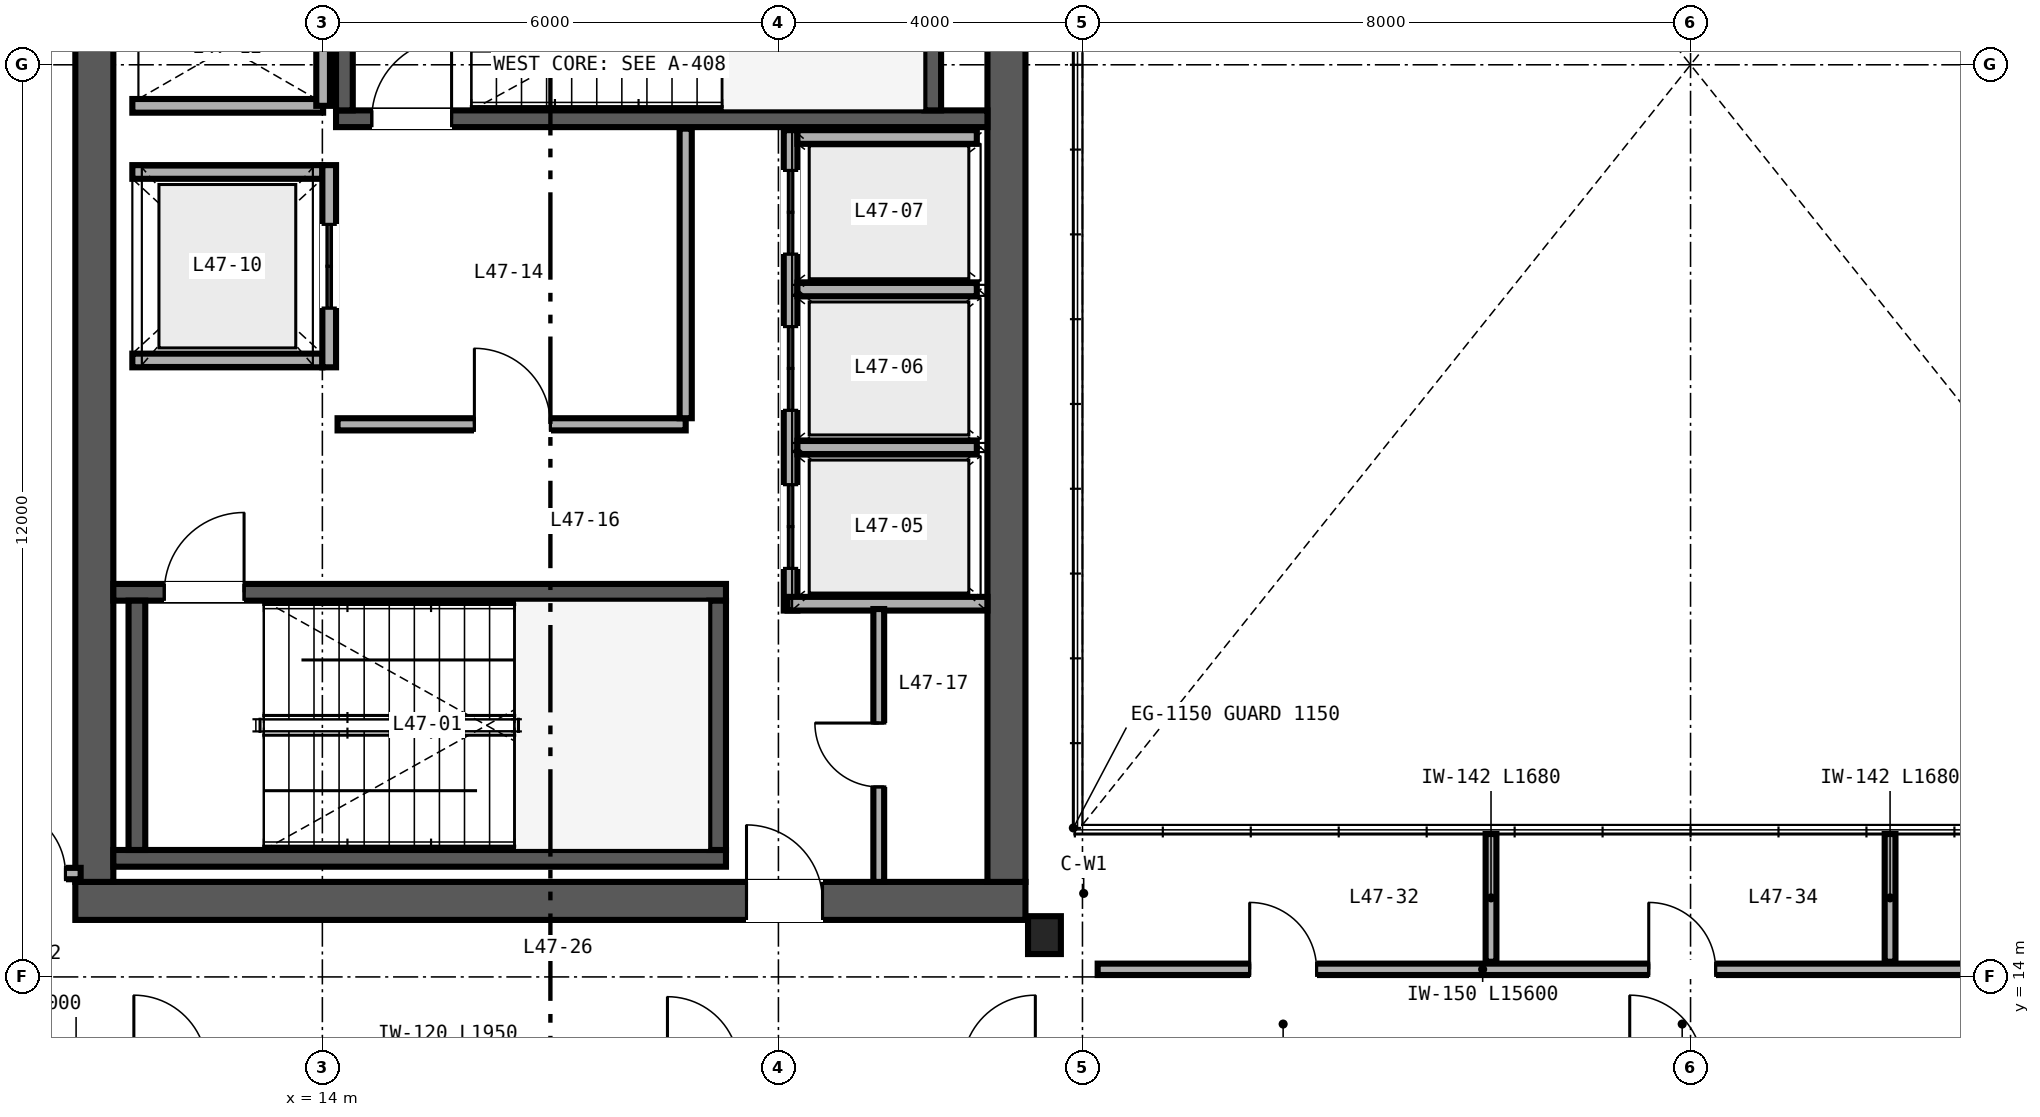
"""IFC4 building model, lengths in metres.
Left out: names, types, materials, properties, quantities, classifications, styles, units other than length and angle.
Written with IfcOpenShell. Run it as: python <this file> out.ifc"""

import sys

from ifc_helpers import new_model, si_unit, direction, frame, frame_2d, origin, origin_2d, place, context, subcontext, project, spatial, rectangle, i_section, extrude, source, transform, mapped, element, fill, save


model = new_model("IFC4")
c1 = context("Model", 3, precision=1e-05, world=origin(), true_north=direction((0.0, 1.0)))
c2 = subcontext(c1, "Body", "Model", "MODEL_VIEW")
j1 = project(units=[si_unit("LENGTHUNIT", "METRE"), si_unit("PLANEANGLEUNIT", "RADIAN")], contexts=[c1])
p1 = place(None, origin())
s1 = spatial("IfcSite", under=j1, at=p1, CompositionType="ELEMENT")
p2 = place(p1, origin())
s2 = spatial("IfcBuilding", under=s1, at=p2, CompositionType="ELEMENT")
p3 = place(p2, frame((0.0, 0.0, 188.4)))
s3 = spatial("IfcBuildingStorey", under=s2, at=p3, CompositionType="ELEMENT", Elevation=188.4)
p4 = place(p3, frame((10.75, 15.0, 0.0), z_axis=(0.0, 0.0, 1.0), x_axis=(1.0, 0.0, 0.0)))
e1 = element("IfcWall", 1, at=p4, inside=s3, PredefinedType="SHEAR", context=c2, shape_type="SweptSolid", body=[
    extrude(rectangle(XDim=12.5, YDim=0.5, at=frame_2d((6.25, 0.0))), origin(), (0.0, 0.0, 1.0), 3.37),
])
p5 = place(p4, frame((8.83, 0.0, 0.0)))
e2 = element("IfcOpeningElement", 2, at=p5, cuts=e1, PredefinedType="OPENING", context=c2, shape_type="SweptSolid", body=[
    extrude(rectangle(XDim=1.0, YDim=2.15, at=frame_2d((0.5, 1.075))), frame((0.0, 0.26, 0.0), z_axis=(0.0, -1.0, 0.0), x_axis=(1.0, 0.0, 0.0)), (0.0, 0.0, 1.0), 0.52),
])
for number, where, z_axis, x_axis in (
    (3, (11.0, 15.25, 0.0), (0.0, 0.0, 1.0), (0.0, 1.0, 0.0)),
    (4, (23.0, 15.25, 0.0), (0.0, 0.0, 1.0), (0.0, 1.0, 0.0)),
):
    element("IfcWall", number, at=place(p3, frame(where, z_axis=z_axis, x_axis=x_axis)), inside=s3, PredefinedType="SHEAR", context=c2, shape_type="SweptSolid", body=[
        extrude(rectangle(XDim=21.5, YDim=0.5, at=frame_2d((10.75, 0.0))), origin(), (0.0, 0.0, 1.0), 3.37),
    ])
p6 = place(p3, frame((11.25, 15.56, 0.0), z_axis=(0.0, 0.0, 1.0), x_axis=(1.0, 0.0, 0.0)))
e5 = element("IfcWall", 5, at=p6, inside=s3, PredefinedType="SHEAR", context=c2, shape_type="SweptSolid", body=[
    extrude(rectangle(XDim=8.06, YDim=0.22, at=frame_2d((4.03, 0.0))), origin(), (0.0, 0.0, 1.0), 3.4),
])
p7 = place(p3, frame((11.25, 19.06, 0.0), z_axis=(0.0, 0.0, 1.0), x_axis=(1.0, 0.0, 0.0)))
e6 = element("IfcWall", 6, at=p7, inside=s3, PredefinedType="SHEAR", context=c2, shape_type="SweptSolid", body=[
    extrude(rectangle(XDim=8.06, YDim=0.22, at=frame_2d((4.03, 0.0))), origin(), (0.0, 0.0, 1.0), 3.4),
])
p8 = place(p7, frame((0.67, 0.0, 0.0)))
e7 = element("IfcOpeningElement", 7, at=p8, cuts=e6, PredefinedType="OPENING", context=c2, shape_type="SweptSolid", body=[
    extrude(rectangle(XDim=1.05, YDim=2.15, at=frame_2d((0.525, 1.075))), frame((0.0, 0.12, 0.0), z_axis=(0.0, -1.0, 0.0), x_axis=(1.0, 0.0, 0.0)), (0.0, 0.0, 1.0), 0.24),
])
for number, where, z_axis, x_axis in (
    (8, (11.56, 15.67, 0.0), (0.0, 0.0, 1.0), (0.0, 1.0, 0.0)),
    (9, (19.2, 15.67, 0.0), (0.0, 0.0, 1.0), (0.0, 1.0, 0.0)),
):
    element("IfcWall", number, at=place(p3, frame(where, z_axis=z_axis, x_axis=x_axis)), inside=s3, PredefinedType="SHEAR", context=c2, shape_type="SweptSolid", body=[
        extrude(rectangle(XDim=3.28, YDim=0.22, at=frame_2d((1.64, 0.0))), origin(), (0.0, 0.0, 1.0), 3.4),
    ])
p9 = place(p3, frame((14.18, 25.29, 0.0), z_axis=(0.0, 0.0, 1.0), x_axis=(1.0, 0.0, 0.0)))
e10 = element("IfcWall", 10, at=p9, inside=s3, PredefinedType="SHEAR", context=c2, shape_type="SweptSolid", body=[
    extrude(rectangle(XDim=8.57, YDim=0.22, at=frame_2d((4.285, 0.0))), origin(), (0.0, 0.0, 1.0), 3.4),
])
p10 = place(p9, frame((0.47, 0.0, 0.0)))
e11 = element("IfcOpeningElement", 11, at=p10, cuts=e10, PredefinedType="OPENING", context=c2, shape_type="SweptSolid", body=[
    extrude(rectangle(XDim=1.05, YDim=2.15, at=frame_2d((0.525, 1.075))), frame((0.0, 0.12, 0.0), z_axis=(0.0, -1.0, 0.0), x_axis=(1.0, 0.0, 0.0)), (0.0, 0.0, 1.0), 0.24),
])
for number, where, z_axis, x_axis in (
    (12, (14.29, 25.4, 0.0), (0.0, 0.0, 1.0), (0.0, 1.0, 0.0)),
    (13, (22.03, 25.4, 0.0), (0.0, 0.0, 1.0), (0.0, 1.0, 0.0)),
):
    element("IfcWall", number, at=place(p3, frame(where, z_axis=z_axis, x_axis=x_axis)), inside=s3, PredefinedType="SHEAR", context=c2, shape_type="SweptSolid", body=[
        extrude(rectangle(XDim=3.28, YDim=0.22, at=frame_2d((1.64, 0.0))), origin(), (0.0, 0.0, 1.0), 3.4),
    ])
m1 = source(origin(), c2, "Body", "SweptSolid", [
    extrude(i_section(OverallWidth=0.432, OverallDepth=0.498, WebThickness=0.056, FlangeThickness=0.089, FilletRadius=0.025, at=origin_2d()), origin(), (0.0, 0.0, 1.0), 3.37),
])
p11 = place(p3, frame((23.5, 14.55, 0.0), z_axis=(0.0, 0.0, 1.0), x_axis=(1.0, 0.0, 0.0)))
e14 = element("IfcColumn", 14, at=p11, inside=s3, PredefinedType="COLUMN", context=c2, shape_type="MappedRepresentation", body=[
    mapped(m1, transform((0.0, 0.0, 0.0), scale=1.0)),
])
p12 = place(p3, frame((20.16, 18.82, 0.0), z_axis=(0.0, 0.0, 1.0), x_axis=(0.0, 1.0, 0.0)))
e15 = element("IfcWall", 15, at=p12, inside=s3, PredefinedType="SOLIDWALL", context=c2, shape_type="SweptSolid", body=[
    extrude(rectangle(XDim=6.32, YDim=0.18, at=frame_2d((3.16, 0.0))), origin(), (0.0, 0.0, 1.0), 2.47),
])
p13 = place(p12, frame((0.555, 0.0, 0.0)))
e16 = element("IfcOpeningElement", 16, at=p13, cuts=e15, PredefinedType="OPENING", context=c2, shape_type="SweptSolid", body=[
    extrude(rectangle(XDim=1.1, YDim=2.2, at=frame_2d((0.55, 1.1))), frame((0.0, 0.1, 0.0), z_axis=(0.0, -1.0, 0.0), x_axis=(1.0, 0.0, 0.0)), (0.0, 0.0, 1.0), 0.2),
])
p14 = place(p12, frame((2.635, 0.0, 0.0)))
e17 = element("IfcOpeningElement", 17, at=p14, cuts=e15, PredefinedType="OPENING", context=c2, shape_type="SweptSolid", body=[
    extrude(rectangle(XDim=1.1, YDim=2.2, at=frame_2d((0.55, 1.1))), frame((0.0, 0.1, 0.0), z_axis=(0.0, -1.0, 0.0), x_axis=(1.0, 0.0, 0.0)), (0.0, 0.0, 1.0), 0.2),
])
p15 = place(p12, frame((4.69, 0.0, 0.0)))
e18 = element("IfcOpeningElement", 18, at=p15, cuts=e15, PredefinedType="OPENING", context=c2, shape_type="SweptSolid", body=[
    extrude(rectangle(XDim=1.1, YDim=2.2, at=frame_2d((0.55, 1.1))), frame((0.0, 0.1, 0.0), z_axis=(0.0, -1.0, 0.0), x_axis=(1.0, 0.0, 0.0)), (0.0, 0.0, 1.0), 0.2),
])
p16 = place(p3, frame((20.12, 18.91, 0.0), z_axis=(0.0, 0.0, 1.0), x_axis=(1.0, 0.0, 0.0)))
e19 = element("IfcWall", 19, at=p16, inside=s3, PredefinedType="SOLIDWALL", context=c2, shape_type="SweptSolid", body=[
    extrude(rectangle(XDim=2.63, YDim=0.18, at=frame_2d((1.315, 0.0))), origin(), (0.0, 0.0, 1.0), 3.37),
])
p17 = place(p3, frame((20.25, 25.05, 0.0), z_axis=(0.0, 0.0, 1.0), x_axis=(1.0, 0.0, 0.0)))
e20 = element("IfcWall", 20, at=p17, inside=s3, PredefinedType="SOLIDWALL", context=c2, shape_type="SweptSolid", body=[
    extrude(rectangle(XDim=2.36, YDim=0.18, at=frame_2d((1.18, 0.0))), origin(), (0.0, 0.0, 1.0), 3.37),
])
p18 = place(p3, frame((20.25, 20.965, 0.0), z_axis=(0.0, 0.0, 1.0), x_axis=(1.0, 0.0, 0.0)))
e21 = element("IfcWall", 21, at=p18, inside=s3, PredefinedType="SOLIDWALL", context=c2, shape_type="SweptSolid", body=[
    extrude(rectangle(XDim=2.36, YDim=0.18, at=frame_2d((1.18, 0.0))), origin(), (0.0, 0.0, 1.0), 2.47),
])
p19 = place(p3, frame((20.25, 23.045, 0.0), z_axis=(0.0, 0.0, 1.0), x_axis=(1.0, 0.0, 0.0)))
e22 = element("IfcWall", 22, at=p19, inside=s3, PredefinedType="SOLIDWALL", context=c2, shape_type="SweptSolid", body=[
    extrude(rectangle(XDim=2.36, YDim=0.18, at=frame_2d((1.18, 0.0))), origin(), (0.0, 0.0, 1.0), 3.37),
])
for number, where, z_axis, x_axis in (
    (23, (11.5, 22.11, 0.0), (0.0, 0.0, 1.0), (1.0, 0.0, 0.0)),
    (24, (11.5, 24.59, 0.0), (0.0, 0.0, 1.0), (1.0, 0.0, 0.0)),
):
    element("IfcWall", number, at=place(p3, frame(where, z_axis=z_axis, x_axis=x_axis)), inside=s3, PredefinedType="SOLIDWALL", context=c2, shape_type="SweptSolid", body=[
        extrude(rectangle(XDim=2.5, YDim=0.18, at=frame_2d((1.25, 0.0))), origin(), (0.0, 0.0, 1.0), 3.37),
    ])
p20 = place(p3, frame((14.09, 22.02, 0.0), z_axis=(0.0, 0.0, 1.0), x_axis=(0.0, 1.0, 0.0)))
e25 = element("IfcWall", 25, at=p20, inside=s3, PredefinedType="SOLIDWALL", context=c2, shape_type="SweptSolid", body=[
    extrude(rectangle(XDim=2.66, YDim=0.18, at=frame_2d((1.33, 0.0))), origin(), (0.0, 0.0, 1.0), 3.37),
])
p21 = place(p20, frame((0.78, 0.0, 0.0)))
e26 = element("IfcOpeningElement", 26, at=p21, cuts=e25, PredefinedType="OPENING", context=c2, shape_type="SweptSolid", body=[
    extrude(rectangle(XDim=1.1, YDim=2.2, at=frame_2d((0.55, 1.1))), frame((0.0, 0.1, 0.0), z_axis=(0.0, -1.0, 0.0), x_axis=(1.0, 0.0, 0.0)), (0.0, 0.0, 1.0), 0.2),
])
p22 = place(p3, frame((11.5, 25.46, 0.0), z_axis=(0.0, 0.0, 1.0), x_axis=(1.0, 0.0, 0.0)))
e27 = element("IfcWall", 27, at=p22, inside=s3, PredefinedType="SOLIDWALL", context=c2, shape_type="SweptSolid", body=[
    extrude(rectangle(XDim=2.51, YDim=0.18, at=frame_2d((1.255, 0.0))), origin(), (0.0, 0.0, 1.0), 3.37),
])
p23 = place(p3, frame((14.01, 25.46, 0.0), z_axis=(0.0, 0.0, 1.0), x_axis=(0.0, 1.0, 0.0)))
e28 = element("IfcWall", 28, at=p23, inside=s3, PredefinedType="SOLIDWALL", context=c2, shape_type="SweptSolid", body=[
    extrude(rectangle(XDim=3.08, YDim=0.18, at=frame_2d((1.54, 0.0))), origin(), (0.0, 0.0, 1.0), 3.37),
])
p24 = place(p3, frame((14.2, 21.27, 0.0), z_axis=(0.0, 0.0, 1.0), x_axis=(1.0, 0.0, 0.0)))
e29 = element("IfcWall", 29, at=p24, inside=s3, PredefinedType="PARTITIONING", context=c2, shape_type="SweptSolid", body=[
    extrude(rectangle(XDim=4.58, YDim=0.16, at=frame_2d((2.29, 0.0))), origin(), (0.0, 0.0, 1.0), 3.37),
])
p25 = place(p24, frame((1.8, 0.0, 0.0)))
e30 = element("IfcOpeningElement", 30, at=p25, cuts=e29, PredefinedType="OPENING", context=c2, shape_type="SweptSolid", body=[
    extrude(rectangle(XDim=1.0, YDim=2.15, at=frame_2d((0.5, 1.075))), frame((0.0, 0.09, 0.0), z_axis=(0.0, -1.0, 0.0), x_axis=(1.0, 0.0, 0.0)), (0.0, 0.0, 1.0), 0.18),
])
p26 = place(p3, frame((18.78, 21.35, 0.0), z_axis=(0.0, 0.0, 1.0), x_axis=(0.0, 1.0, 0.0)))
e31 = element("IfcWall", 31, at=p26, inside=s3, PredefinedType="PARTITIONING", context=c2, shape_type="SweptSolid", body=[
    extrude(rectangle(XDim=3.81, YDim=0.16, at=frame_2d((1.905, 0.0))), origin(), (0.0, 0.0, 1.0), 3.37),
])
p27 = place(p3, frame((21.32, 15.25, 0.0), z_axis=(0.0, 0.0, 1.0), x_axis=(0.0, 1.0, 0.0)))
e32 = element("IfcWall", 32, at=p27, inside=s3, PredefinedType="PARTITIONING", context=c2, shape_type="SweptSolid", body=[
    extrude(rectangle(XDim=3.59, YDim=0.142, at=frame_2d((1.795, 0.0))), origin(), (0.0, 0.0, 1.0), 3.37),
])
p28 = place(p27, frame((1.25, 0.0, 0.0)))
e33 = element("IfcOpeningElement", 33, at=p28, cuts=e32, PredefinedType="OPENING", context=c2, shape_type="SweptSolid", body=[
    extrude(rectangle(XDim=0.84, YDim=2.1, at=frame_2d((0.42, 1.05))), frame((0.0, 0.081, 0.0), z_axis=(0.0, -1.0, 0.0), x_axis=(1.0, 0.0, 0.0)), (0.0, 0.0, 1.0), 0.162),
])
p29 = place(p3, frame((24.2, 14.1, 0.0), z_axis=(0.0, 0.0, 1.0), x_axis=(1.0, 0.0, 0.0)))
e34 = element("IfcWall", 34, at=p29, inside=s3, PredefinedType="PARTITIONING", context=c2, shape_type="SweptSolid", body=[
    extrude(rectangle(XDim=15.6, YDim=0.15, at=frame_2d((7.8, 0.0))), origin(), (0.0, 0.0, 1.0), 3.37),
])
p30 = place(p29, frame((2.0, 0.0, 0.0)))
e35 = element("IfcOpeningElement", 35, at=p30, cuts=e34, PredefinedType="OPENING", context=c2, shape_type="SweptSolid", body=[
    extrude(rectangle(XDim=0.88, YDim=2.15, at=frame_2d((0.44, 1.075))), frame((0.0, 0.085, 0.0), z_axis=(0.0, -1.0, 0.0), x_axis=(1.0, 0.0, 0.0)), (0.0, 0.0, 1.0), 0.17),
])
p31 = place(p29, frame((7.25, 0.0, 0.0)))
e36 = element("IfcOpeningElement", 36, at=p31, cuts=e34, PredefinedType="OPENING", context=c2, shape_type="SweptSolid", body=[
    extrude(rectangle(XDim=0.88, YDim=2.15, at=frame_2d((0.44, 1.075))), frame((0.0, 0.085, 0.0), z_axis=(0.0, -1.0, 0.0), x_axis=(1.0, 0.0, 0.0)), (0.0, 0.0, 1.0), 0.17),
])
p32 = place(p29, frame((12.5, 0.0, 0.0)))
e37 = element("IfcOpeningElement", 37, at=p32, cuts=e34, PredefinedType="OPENING", context=c2, shape_type="SweptSolid", body=[
    extrude(rectangle(XDim=0.88, YDim=2.15, at=frame_2d((0.44, 1.075))), frame((0.0, 0.085, 0.0), z_axis=(0.0, -1.0, 0.0), x_axis=(1.0, 0.0, 0.0)), (0.0, 0.0, 1.0), 0.17),
])
for number, where, z_axis, x_axis in (
    (38, (29.375, 14.2, 0.0), (0.0, 0.0, 1.0), (0.0, 1.0, 0.0)),
    (39, (34.625, 14.2, 0.0), (0.0, 0.0, 1.0), (0.0, 1.0, 0.0)),
):
    element("IfcWall", number, at=place(p3, frame(where, z_axis=z_axis, x_axis=x_axis)), inside=s3, PredefinedType="PARTITIONING", context=c2, shape_type="SweptSolid", body=[
        extrude(rectangle(XDim=1.68, YDim=0.142, at=frame_2d((0.84, 0.0))), origin(), (0.0, 0.0, 1.0), 3.37),
    ])
p33 = place(p3, frame((8.16, 15.36, 0.0), z_axis=(0.0, 0.0, 1.0), x_axis=(1.0, 0.0, 0.0)))
e40 = element("IfcWall", 40, at=p33, inside=s3, PredefinedType="PARTITIONING", context=c2, shape_type="SweptSolid", body=[
    extrude(rectangle(XDim=2.66, YDim=0.15, at=frame_2d((1.33, 0.0))), origin(), (0.0, 0.0, 1.0), 2.591),
])
p34 = place(p33, frame((1.58, 0.0, 0.0)))
e41 = element("IfcOpeningElement", 41, at=p34, cuts=e40, PredefinedType="OPENING", context=c2, shape_type="SweptSolid", body=[
    extrude(rectangle(XDim=0.88, YDim=2.15, at=frame_2d((0.44, 1.075))), frame((0.0, 0.085, 0.0), z_axis=(0.0, -1.0, 0.0), x_axis=(1.0, 0.0, 0.0)), (0.0, 0.0, 1.0), 0.17),
])
m2 = source(origin(), c2, "Body", "SweptSolid", [
    extrude(rectangle(XDim=1.05, YDim=2.15, at=frame_2d((0.525, 1.075))), frame((0.0, 0.025, 0.0), z_axis=(0.0, -1.0, 0.0), x_axis=(1.0, 0.0, 0.0)), (0.0, 0.0, 1.0), 0.05),
])
p35 = place(p8, origin())
e42 = element("IfcDoor", 42, at=p35, inside=s3, OperationType="SINGLE_SWING_RIGHT", PredefinedType="DOOR", context=c2, shape_type="MappedRepresentation", body=[
    mapped(m2, transform((0.0, 0.0, 0.0), scale=1.0)),
])
fill(e7, e42)
p36 = place(p10, origin())
e43 = element("IfcDoor", 43, at=p36, inside=s3, OperationType="SINGLE_SWING_RIGHT", PredefinedType="DOOR", context=c2, shape_type="MappedRepresentation", body=[
    mapped(m2, transform((0.0, 0.0, 0.0), scale=1.0)),
])
fill(e11, e43)
m3 = source(origin(), c2, "Body", "SweptSolid", [
    extrude(rectangle(XDim=1.1, YDim=2.2, at=frame_2d((0.55, 1.1))), frame((0.0, 0.025, 0.0), z_axis=(0.0, -1.0, 0.0), x_axis=(1.0, 0.0, 0.0)), (0.0, 0.0, 1.0), 0.05),
])
p37 = place(p13, origin())
e44 = element("IfcDoor", 44, at=p37, inside=s3, OperationType="DOUBLE_DOOR_SLIDING", PredefinedType="DOOR", context=c2, shape_type="MappedRepresentation", body=[
    mapped(m3, transform((0.0, 0.0, 0.0), scale=1.0)),
])
fill(e16, e44)
p38 = place(p14, origin())
e45 = element("IfcDoor", 45, at=p38, inside=s3, OperationType="DOUBLE_DOOR_SLIDING", PredefinedType="DOOR", context=c2, shape_type="MappedRepresentation", body=[
    mapped(m3, transform((0.0, 0.0, 0.0), scale=1.0)),
])
fill(e17, e45)
p39 = place(p15, origin())
e46 = element("IfcDoor", 46, at=p39, inside=s3, OperationType="DOUBLE_DOOR_SLIDING", PredefinedType="DOOR", context=c2, shape_type="MappedRepresentation", body=[
    mapped(m3, transform((0.0, 0.0, 0.0), scale=1.0)),
])
fill(e18, e46)
p40 = place(p21, origin())
e47 = element("IfcDoor", 47, at=p40, inside=s3, OperationType="DOUBLE_DOOR_SLIDING", PredefinedType="DOOR", context=c2, shape_type="MappedRepresentation", body=[
    mapped(m3, transform((0.0, 0.0, 0.0), scale=1.0)),
])
fill(e26, e47)
m4 = source(origin(), c2, "Body", "SweptSolid", [
    extrude(rectangle(XDim=1.0, YDim=2.15, at=frame_2d((0.5, 1.075))), frame((0.0, 0.025, 0.0), z_axis=(0.0, -1.0, 0.0), x_axis=(1.0, 0.0, 0.0)), (0.0, 0.0, 1.0), 0.05),
])
p41 = place(p25, origin())
e48 = element("IfcDoor", 48, at=p41, inside=s3, OperationType="SINGLE_SWING_LEFT", PredefinedType="DOOR", context=c2, shape_type="MappedRepresentation", body=[
    mapped(m4, transform((0.0, 0.0, 0.0), scale=1.0)),
])
fill(e30, e48)
m5 = source(origin(), c2, "Body", "SweptSolid", [
    extrude(rectangle(XDim=0.84, YDim=2.1, at=frame_2d((0.42, 1.05))), frame((0.0, 0.025, 0.0), z_axis=(0.0, -1.0, 0.0), x_axis=(1.0, 0.0, 0.0)), (0.0, 0.0, 1.0), 0.05),
])
p42 = place(p28, origin())
e49 = element("IfcDoor", 49, at=p42, inside=s3, OperationType="SINGLE_SWING_RIGHT", PredefinedType="DOOR", context=c2, shape_type="MappedRepresentation", body=[
    mapped(m5, transform((0.0, 0.0, 0.0), scale=1.0)),
])
fill(e33, e49)
p43 = place(p5, origin())
e50 = element("IfcDoor", 50, at=p43, inside=s3, OperationType="SINGLE_SWING_LEFT", PredefinedType="DOOR", context=c2, shape_type="MappedRepresentation", body=[
    mapped(m4, transform((0.0, 0.0, 0.0), scale=1.0)),
])
fill(e2, e50)
m6 = source(origin(), c2, "Body", "SweptSolid", [
    extrude(rectangle(XDim=0.88, YDim=2.15, at=frame_2d((0.44, 1.075))), frame((0.0, 0.025, 0.0), z_axis=(0.0, -1.0, 0.0), x_axis=(1.0, 0.0, 0.0)), (0.0, 0.0, 1.0), 0.05),
])
p44 = place(p30, origin())
e51 = element("IfcDoor", 51, at=p44, inside=s3, OperationType="SINGLE_SWING_LEFT", PredefinedType="DOOR", context=c2, shape_type="MappedRepresentation", body=[
    mapped(m6, transform((0.0, 0.0, 0.0), scale=1.0)),
])
fill(e35, e51)
p45 = place(p31, origin())
e52 = element("IfcDoor", 52, at=p45, inside=s3, OperationType="SINGLE_SWING_LEFT", PredefinedType="DOOR", context=c2, shape_type="MappedRepresentation", body=[
    mapped(m6, transform((0.0, 0.0, 0.0), scale=1.0)),
])
fill(e36, e52)
p46 = place(p34, origin())
e53 = element("IfcDoor", 53, at=p46, inside=s3, OperationType="SINGLE_SWING_LEFT", PredefinedType="DOOR", context=c2, shape_type="MappedRepresentation", body=[
    mapped(m6, transform((0.0, 0.0, 0.0), scale=1.0)),
])
fill(e41, e53)
save(model, sys.argv[1])
